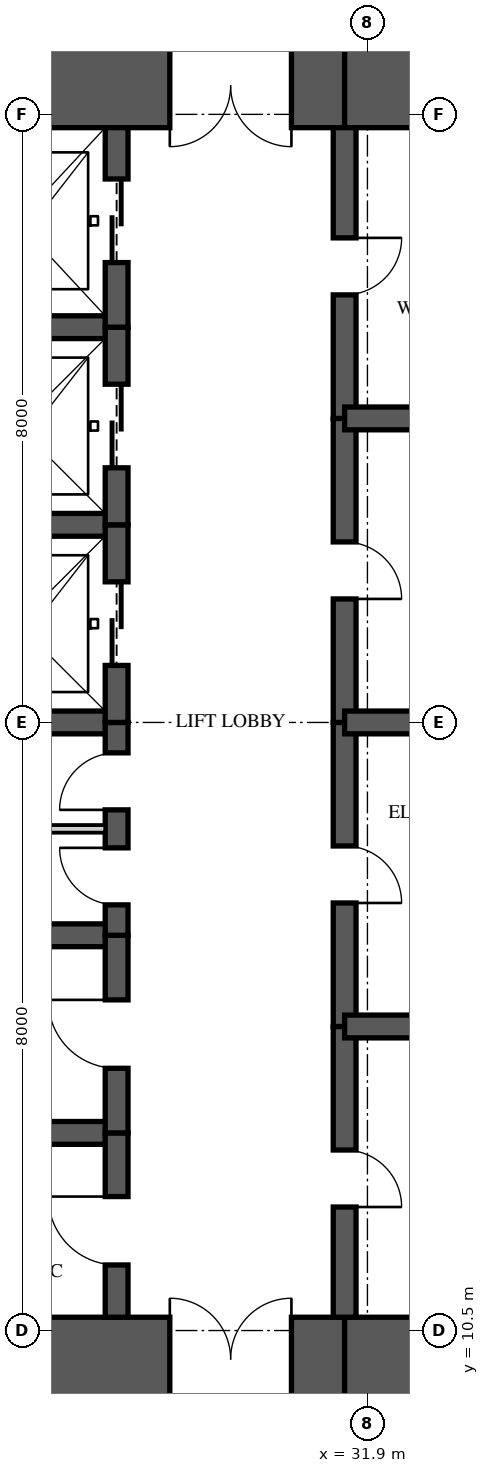
"""IFC4 building model, lengths in metres.
Left out: names, types, materials, properties, quantities, classifications, styles, units other than length and angle.
Written with IfcOpenShell. Run it as: python <this file> out.ifc"""

import sys

from ifc_helpers import new_model, si_unit, direction, frame, frame_2d, origin, place, context, subcontext, project, spatial, rectangle, extrude, element, fill, save


model = new_model("IFC4")
c1 = context("Model", 3, precision=1e-05, world=origin(), true_north=direction((0.0, 1.0)))
c2 = subcontext(c1, "Body", "Model", "MODEL_VIEW")
j1 = project(units=[si_unit("LENGTHUNIT", "METRE"), si_unit("PLANEANGLEUNIT", "RADIAN")], contexts=[c1])
p1 = place(None, origin())
s1 = spatial("IfcSite", under=j1, at=p1, CompositionType="ELEMENT")
p2 = place(p1, origin())
s2 = spatial("IfcBuilding", under=s1, at=p2, CompositionType="ELEMENT")
p3 = place(p2, frame((0.0, 0.0, 252.95)))
s3 = spatial("IfcBuildingStorey", under=s2, at=p3, CompositionType="ELEMENT", Elevation=252.95)
p4 = place(p3, frame((26.0, 10.125, 0.0), z_axis=(0.0, 0.0, 1.0), x_axis=(1.0, 0.0, 0.0)))
e1 = element("IfcWall", 1, at=p4, inside=s3, PredefinedType="SHEAR", context=c2, shape_type="SweptSolid", body=[
    extrude(rectangle(XDim=5.6, YDim=1.1, at=frame_2d((2.8, 0.0))), origin(), (0.0, 0.0, 1.0), 3.5),
])
p5 = place(p4, frame((3.3, 0.0, 0.0)))
e2 = element("IfcOpeningElement", 2, at=p5, cuts=e1, PredefinedType="OPENING", context=c2, shape_type="SweptSolid", body=[
    extrude(rectangle(XDim=1.6, YDim=2.1, at=frame_2d((0.8, 1.05))), frame((0.0, 0.56, 0.0), z_axis=(0.0, -1.0, 0.0), x_axis=(1.0, 0.0, 0.0)), (0.0, 0.0, 1.0), 1.12),
])
for number, where, z_axis, x_axis in (
    (3, (31.6, 10.125, 0.0), (0.0, 0.0, 1.0), (1.0, 0.0, 0.0)),
    (4, (35.9, 26.875, 0.0), (0.0, 0.0, 1.0), (-1.0, 0.0, 0.0)),
):
    element("IfcWall", number, at=place(p3, frame(where, z_axis=z_axis, x_axis=x_axis)), inside=s3, PredefinedType="SHEAR", context=c2, shape_type="SweptSolid", body=[
        extrude(rectangle(XDim=4.3, YDim=1.1, at=frame_2d((2.15, 0.0))), origin(), (0.0, 0.0, 1.0), 3.5),
    ])
p6 = place(p3, frame((31.6, 26.875, 0.0), z_axis=(0.0, 0.0, 1.0), x_axis=(-1.0, 0.0, 0.0)))
e5 = element("IfcWall", 5, at=p6, inside=s3, PredefinedType="SHEAR", context=c2, shape_type="SweptSolid", body=[
    extrude(rectangle(XDim=5.6, YDim=1.1, at=frame_2d((2.8, 0.0))), origin(), (0.0, 0.0, 1.0), 3.5),
])
p7 = place(p6, frame((0.7, 0.0, 0.0)))
e6 = element("IfcOpeningElement", 6, at=p7, cuts=e5, PredefinedType="OPENING", context=c2, shape_type="SweptSolid", body=[
    extrude(rectangle(XDim=1.6, YDim=2.1, at=frame_2d((0.8, 1.05))), frame((0.0, 0.56, 0.0), z_axis=(0.0, -1.0, 0.0), x_axis=(1.0, 0.0, 0.0)), (0.0, 0.0, 1.0), 1.12),
])
p8 = place(p3, frame((28.6, 10.675, 0.0), z_axis=(0.0, 0.0, 1.0), x_axis=(0.0, 1.0, 0.0)))
e7 = element("IfcWall", 7, at=p8, inside=s3, PredefinedType="SHEAR", context=c2, shape_type="SweptSolid", body=[
    extrude(rectangle(XDim=2.425, YDim=0.3, at=frame_2d((1.212, 0.0))), origin(), (0.0, 0.0, 1.0), 3.5),
])
p9 = place(p8, frame((0.688, 0.0, 0.0)))
e8 = element("IfcOpeningElement", 8, at=p9, cuts=e7, PredefinedType="OPENING", context=c2, shape_type="SweptSolid", body=[
    extrude(rectangle(XDim=0.9, YDim=2.1, at=frame_2d((0.45, 1.05))), frame((0.0, 0.16, 0.0), z_axis=(0.0, -1.0, 0.0), x_axis=(1.0, 0.0, 0.0)), (0.0, 0.0, 1.0), 0.32),
])
p10 = place(p3, frame((28.6, 13.1, 0.0), z_axis=(0.0, 0.0, 1.0), x_axis=(0.0, 1.0, 0.0)))
e9 = element("IfcWall", 9, at=p10, inside=s3, PredefinedType="SHEAR", context=c2, shape_type="SweptSolid", body=[
    extrude(rectangle(XDim=2.6, YDim=0.3, at=frame_2d((1.3, 0.0))), origin(), (0.0, 0.0, 1.0), 3.5),
])
p11 = place(p10, frame((0.85, 0.0, 0.0)))
e10 = element("IfcOpeningElement", 10, at=p11, cuts=e9, PredefinedType="OPENING", context=c2, shape_type="SweptSolid", body=[
    extrude(rectangle(XDim=0.9, YDim=2.1, at=frame_2d((0.45, 1.05))), frame((0.0, 0.16, 0.0), z_axis=(0.0, -1.0, 0.0), x_axis=(1.0, 0.0, 0.0)), (0.0, 0.0, 1.0), 0.32),
])
p12 = place(p3, frame((28.6, 15.7, 0.0), z_axis=(0.0, 0.0, 1.0), x_axis=(0.0, 1.0, 0.0)))
e11 = element("IfcWall", 11, at=p12, inside=s3, PredefinedType="SHEAR", context=c2, shape_type="SweptSolid", body=[
    extrude(rectangle(XDim=2.8, YDim=0.3, at=frame_2d((1.4, 0.0))), origin(), (0.0, 0.0, 1.0), 3.5),
])
p13 = place(p12, frame((0.4, 0.0, 0.0)))
e12 = element("IfcOpeningElement", 12, at=p13, cuts=e11, PredefinedType="OPENING", context=c2, shape_type="SweptSolid", body=[
    extrude(rectangle(XDim=0.75, YDim=2.1, at=frame_2d((0.375, 1.05))), frame((0.0, 0.16, 0.0), z_axis=(0.0, -1.0, 0.0), x_axis=(1.0, 0.0, 0.0)), (0.0, 0.0, 1.0), 0.32),
])
p14 = place(p12, frame((1.65, 0.0, 0.0)))
e13 = element("IfcOpeningElement", 13, at=p14, cuts=e11, PredefinedType="OPENING", context=c2, shape_type="SweptSolid", body=[
    extrude(rectangle(XDim=0.75, YDim=2.1, at=frame_2d((0.375, 1.05))), frame((0.0, 0.16, 0.0), z_axis=(0.0, -1.0, 0.0), x_axis=(1.0, 0.0, 0.0)), (0.0, 0.0, 1.0), 0.32),
])
p15 = place(p3, frame((28.6, 18.5, 0.0), z_axis=(0.0, 0.0, 1.0), x_axis=(0.0, 1.0, 0.0)))
e14 = element("IfcWall", 14, at=p15, inside=s3, PredefinedType="SHEAR", context=c2, shape_type="SweptSolid", body=[
    extrude(rectangle(XDim=2.6, YDim=0.3, at=frame_2d((1.3, 0.0))), origin(), (0.0, 0.0, 1.0), 3.5),
])
p16 = place(p15, frame((0.75, 0.0, 0.0)))
e15 = element("IfcOpeningElement", 15, at=p16, cuts=e14, PredefinedType="OPENING", context=c2, shape_type="SweptSolid", body=[
    extrude(rectangle(XDim=1.1, YDim=2.1, at=frame_2d((0.55, 1.05))), frame((0.0, 0.16, 0.0), z_axis=(0.0, -1.0, 0.0), x_axis=(1.0, 0.0, 0.0)), (0.0, 0.0, 1.0), 0.32),
])
p17 = place(p3, frame((28.6, 21.1, 0.0), z_axis=(0.0, 0.0, 1.0), x_axis=(0.0, 1.0, 0.0)))
e16 = element("IfcWall", 16, at=p17, inside=s3, PredefinedType="SHEAR", context=c2, shape_type="SweptSolid", body=[
    extrude(rectangle(XDim=2.6, YDim=0.3, at=frame_2d((1.3, 0.0))), origin(), (0.0, 0.0, 1.0), 3.5),
])
p18 = place(p17, frame((0.75, 0.0, 0.0)))
e17 = element("IfcOpeningElement", 17, at=p18, cuts=e16, PredefinedType="OPENING", context=c2, shape_type="SweptSolid", body=[
    extrude(rectangle(XDim=1.1, YDim=2.1, at=frame_2d((0.55, 1.05))), frame((0.0, 0.16, 0.0), z_axis=(0.0, -1.0, 0.0), x_axis=(1.0, 0.0, 0.0)), (0.0, 0.0, 1.0), 0.32),
])
p19 = place(p3, frame((28.6, 23.7, 0.0), z_axis=(0.0, 0.0, 1.0), x_axis=(0.0, 1.0, 0.0)))
e18 = element("IfcWall", 18, at=p19, inside=s3, PredefinedType="SHEAR", context=c2, shape_type="SweptSolid", body=[
    extrude(rectangle(XDim=2.625, YDim=0.3, at=frame_2d((1.312, 0.0))), origin(), (0.0, 0.0, 1.0), 3.5),
])
p20 = place(p19, frame((0.85, 0.0, 0.0)))
e19 = element("IfcOpeningElement", 19, at=p20, cuts=e18, PredefinedType="OPENING", context=c2, shape_type="SweptSolid", body=[
    extrude(rectangle(XDim=1.1, YDim=2.1, at=frame_2d((0.55, 1.05))), frame((0.0, 0.16, 0.0), z_axis=(0.0, -1.0, 0.0), x_axis=(1.0, 0.0, 0.0)), (0.0, 0.0, 1.0), 0.32),
])
p21 = place(p3, frame((31.6, 10.675, 0.0), z_axis=(0.0, 0.0, 1.0), x_axis=(0.0, 1.0, 0.0)))
e20 = element("IfcWall", 20, at=p21, inside=s3, PredefinedType="SHEAR", context=c2, shape_type="SweptSolid", body=[
    extrude(rectangle(XDim=3.825, YDim=0.3, at=frame_2d((1.913, 0.0))), origin(), (0.0, 0.0, 1.0), 3.5),
])
p22 = place(p21, frame((1.45, 0.0, 0.0)))
e21 = element("IfcOpeningElement", 21, at=p22, cuts=e20, PredefinedType="OPENING", context=c2, shape_type="SweptSolid", body=[
    extrude(rectangle(XDim=0.75, YDim=2.1, at=frame_2d((0.375, 1.05))), frame((0.0, 0.16, 0.0), z_axis=(0.0, -1.0, 0.0), x_axis=(1.0, 0.0, 0.0)), (0.0, 0.0, 1.0), 0.32),
])
p23 = place(p3, frame((31.6, 14.5, 0.0), z_axis=(0.0, 0.0, 1.0), x_axis=(0.0, 1.0, 0.0)))
e22 = element("IfcWall", 22, at=p23, inside=s3, PredefinedType="SHEAR", context=c2, shape_type="SweptSolid", body=[
    extrude(rectangle(XDim=4.0, YDim=0.3, at=frame_2d((2.0, 0.0))), origin(), (0.0, 0.0, 1.0), 3.5),
])
p24 = place(p23, frame((1.625, 0.0, 0.0)))
e23 = element("IfcOpeningElement", 23, at=p24, cuts=e22, PredefinedType="OPENING", context=c2, shape_type="SweptSolid", body=[
    extrude(rectangle(XDim=0.75, YDim=2.1, at=frame_2d((0.375, 1.05))), frame((0.0, 0.16, 0.0), z_axis=(0.0, -1.0, 0.0), x_axis=(1.0, 0.0, 0.0)), (0.0, 0.0, 1.0), 0.32),
])
p25 = place(p3, frame((31.6, 18.5, 0.0), z_axis=(0.0, 0.0, 1.0), x_axis=(0.0, 1.0, 0.0)))
e24 = element("IfcWall", 24, at=p25, inside=s3, PredefinedType="SHEAR", context=c2, shape_type="SweptSolid", body=[
    extrude(rectangle(XDim=4.0, YDim=0.3, at=frame_2d((2.0, 0.0))), origin(), (0.0, 0.0, 1.0), 3.5),
])
p26 = place(p25, frame((1.625, 0.0, 0.0)))
e25 = element("IfcOpeningElement", 25, at=p26, cuts=e24, PredefinedType="OPENING", context=c2, shape_type="SweptSolid", body=[
    extrude(rectangle(XDim=0.75, YDim=2.1, at=frame_2d((0.375, 1.05))), frame((0.0, 0.16, 0.0), z_axis=(0.0, -1.0, 0.0), x_axis=(1.0, 0.0, 0.0)), (0.0, 0.0, 1.0), 0.32),
])
p27 = place(p3, frame((31.6, 22.5, 0.0), z_axis=(0.0, 0.0, 1.0), x_axis=(0.0, 1.0, 0.0)))
e26 = element("IfcWall", 26, at=p27, inside=s3, PredefinedType="SHEAR", context=c2, shape_type="SweptSolid", body=[
    extrude(rectangle(XDim=3.825, YDim=0.3, at=frame_2d((1.913, 0.0))), origin(), (0.0, 0.0, 1.0), 3.5),
])
p28 = place(p27, frame((1.625, 0.0, 0.0)))
e27 = element("IfcOpeningElement", 27, at=p28, cuts=e26, PredefinedType="OPENING", context=c2, shape_type="SweptSolid", body=[
    extrude(rectangle(XDim=0.75, YDim=2.1, at=frame_2d((0.375, 1.05))), frame((0.0, 0.16, 0.0), z_axis=(0.0, -1.0, 0.0), x_axis=(1.0, 0.0, 0.0)), (0.0, 0.0, 1.0), 0.32),
])
for number, where, z_axis, x_axis in (
    (28, (26.0, 13.1, 0.0), (0.0, 0.0, 1.0), (1.0, 0.0, 0.0)),
    (29, (26.0, 15.7, 0.0), (0.0, 0.0, 1.0), (1.0, 0.0, 0.0)),
    (30, (26.0, 18.5, 0.0), (0.0, 0.0, 1.0), (1.0, 0.0, 0.0)),
    (31, (26.0, 21.1, 0.0), (0.0, 0.0, 1.0), (1.0, 0.0, 0.0)),
    (32, (26.0, 23.7, 0.0), (0.0, 0.0, 1.0), (1.0, 0.0, 0.0)),
):
    element("IfcWall", number, at=place(p3, frame(where, z_axis=z_axis, x_axis=x_axis)), inside=s3, PredefinedType="SHEAR", context=c2, shape_type="SweptSolid", body=[
        extrude(rectangle(XDim=2.6, YDim=0.3, at=frame_2d((1.3, 0.0))), origin(), (0.0, 0.0, 1.0), 3.5),
    ])
for number, where, z_axis, x_axis in (
    (33, (31.6, 14.5, 0.0), (0.0, 0.0, 1.0), (1.0, 0.0, 0.0)),
    (34, (31.6, 18.5, 0.0), (0.0, 0.0, 1.0), (1.0, 0.0, 0.0)),
    (35, (31.6, 22.5, 0.0), (0.0, 0.0, 1.0), (1.0, 0.0, 0.0)),
):
    element("IfcWall", number, at=place(p3, frame(where, z_axis=z_axis, x_axis=x_axis)), inside=s3, PredefinedType="SHEAR", context=c2, shape_type="SweptSolid", body=[
        extrude(rectangle(XDim=4.3, YDim=0.3, at=frame_2d((2.15, 0.0))), origin(), (0.0, 0.0, 1.0), 3.5),
    ])
p29 = place(p3, frame((26.15, 17.1, 0.0), z_axis=(0.0, 0.0, 1.0), x_axis=(1.0, 0.0, 0.0)))
e36 = element("IfcWall", 36, at=p29, inside=s3, PredefinedType="PARTITIONING", context=c2, shape_type="SweptSolid", body=[
    extrude(rectangle(XDim=2.3, YDim=0.1, at=frame_2d((1.15, 0.0))), origin(), (0.0, 0.0, 1.0), 3.26),
])
p30 = place(p16, origin())
e37 = element("IfcDoor", 37, at=p30, inside=s3, OperationType="SLIDING_TO_LEFT", PredefinedType="DOOR", context=c2, shape_type="SweptSolid", body=[
    extrude(rectangle(XDim=1.1, YDim=2.1, at=frame_2d((0.55, 1.05))), frame((0.0, 0.025, 0.0), z_axis=(0.0, -1.0, 0.0), x_axis=(1.0, 0.0, 0.0)), (0.0, 0.0, 1.0), 0.05),
])
fill(e15, e37)
p31 = place(p18, origin())
e38 = element("IfcDoor", 38, at=p31, inside=s3, OperationType="SLIDING_TO_LEFT", PredefinedType="DOOR", context=c2, shape_type="SweptSolid", body=[
    extrude(rectangle(XDim=1.1, YDim=2.1, at=frame_2d((0.55, 1.05))), frame((0.0, 0.025, 0.0), z_axis=(0.0, -1.0, 0.0), x_axis=(1.0, 0.0, 0.0)), (0.0, 0.0, 1.0), 0.05),
])
fill(e17, e38)
p32 = place(p20, origin())
e39 = element("IfcDoor", 39, at=p32, inside=s3, OperationType="SLIDING_TO_LEFT", PredefinedType="DOOR", context=c2, shape_type="SweptSolid", body=[
    extrude(rectangle(XDim=1.1, YDim=2.1, at=frame_2d((0.55, 1.05))), frame((0.0, 0.025, 0.0), z_axis=(0.0, -1.0, 0.0), x_axis=(1.0, 0.0, 0.0)), (0.0, 0.0, 1.0), 0.05),
])
fill(e19, e39)
p33 = place(p9, origin())
e40 = element("IfcDoor", 40, at=p33, inside=s3, OperationType="SINGLE_SWING_RIGHT", PredefinedType="DOOR", context=c2, shape_type="SweptSolid", body=[
    extrude(rectangle(XDim=0.9, YDim=2.1, at=frame_2d((0.45, 1.05))), frame((0.0, 0.025, 0.0), z_axis=(0.0, -1.0, 0.0), x_axis=(1.0, 0.0, 0.0)), (0.0, 0.0, 1.0), 0.05),
])
fill(e8, e40)
p34 = place(p11, origin())
e41 = element("IfcDoor", 41, at=p34, inside=s3, OperationType="SINGLE_SWING_RIGHT", PredefinedType="DOOR", context=c2, shape_type="SweptSolid", body=[
    extrude(rectangle(XDim=0.9, YDim=2.1, at=frame_2d((0.45, 1.05))), frame((0.0, 0.025, 0.0), z_axis=(0.0, -1.0, 0.0), x_axis=(1.0, 0.0, 0.0)), (0.0, 0.0, 1.0), 0.05),
])
fill(e10, e41)
p35 = place(p13, origin())
e42 = element("IfcDoor", 42, at=p35, inside=s3, OperationType="SINGLE_SWING_RIGHT", PredefinedType="DOOR", context=c2, shape_type="SweptSolid", body=[
    extrude(rectangle(XDim=0.75, YDim=2.1, at=frame_2d((0.375, 1.05))), frame((0.0, 0.025, 0.0), z_axis=(0.0, -1.0, 0.0), x_axis=(1.0, 0.0, 0.0)), (0.0, 0.0, 1.0), 0.05),
])
fill(e12, e42)
p36 = place(p14, origin())
e43 = element("IfcDoor", 43, at=p36, inside=s3, OperationType="SINGLE_SWING_LEFT", PredefinedType="DOOR", context=c2, shape_type="SweptSolid", body=[
    extrude(rectangle(XDim=0.75, YDim=2.1, at=frame_2d((0.375, 1.05))), frame((0.0, 0.025, 0.0), z_axis=(0.0, -1.0, 0.0), x_axis=(1.0, 0.0, 0.0)), (0.0, 0.0, 1.0), 0.05),
])
fill(e13, e43)
p37 = place(p5, origin())
e44 = element("IfcDoor", 44, at=p37, inside=s3, OperationType="DOUBLE_DOOR_SINGLE_SWING", PredefinedType="DOOR", context=c2, shape_type="SweptSolid", body=[
    extrude(rectangle(XDim=1.6, YDim=2.1, at=frame_2d((0.8, 1.05))), frame((0.0, 0.025, 0.0), z_axis=(0.0, -1.0, 0.0), x_axis=(1.0, 0.0, 0.0)), (0.0, 0.0, 1.0), 0.05),
])
fill(e2, e44)
p38 = place(p7, origin())
e45 = element("IfcDoor", 45, at=p38, inside=s3, OperationType="DOUBLE_DOOR_SINGLE_SWING", PredefinedType="DOOR", context=c2, shape_type="SweptSolid", body=[
    extrude(rectangle(XDim=1.6, YDim=2.1, at=frame_2d((0.8, 1.05))), frame((0.0, 0.025, 0.0), z_axis=(0.0, -1.0, 0.0), x_axis=(1.0, 0.0, 0.0)), (0.0, 0.0, 1.0), 0.05),
])
fill(e6, e45)
p39 = place(p22, frame((0.75, 0.0, 0.0), z_axis=(0.0, 0.0, 1.0), x_axis=(-1.0, 0.0, 0.0)))
e46 = element("IfcDoor", 46, at=p39, inside=s3, OperationType="SINGLE_SWING_RIGHT", PredefinedType="DOOR", context=c2, shape_type="SweptSolid", body=[
    extrude(rectangle(XDim=0.75, YDim=2.1, at=frame_2d((0.375, 1.05))), frame((0.0, 0.025, 0.0), z_axis=(0.0, -1.0, 0.0), x_axis=(1.0, 0.0, 0.0)), (0.0, 0.0, 1.0), 0.05),
])
fill(e21, e46)
p40 = place(p24, frame((0.75, 0.0, 0.0), z_axis=(0.0, 0.0, 1.0), x_axis=(-1.0, 0.0, 0.0)))
e47 = element("IfcDoor", 47, at=p40, inside=s3, OperationType="SINGLE_SWING_RIGHT", PredefinedType="DOOR", context=c2, shape_type="SweptSolid", body=[
    extrude(rectangle(XDim=0.75, YDim=2.1, at=frame_2d((0.375, 1.05))), frame((0.0, 0.025, 0.0), z_axis=(0.0, -1.0, 0.0), x_axis=(1.0, 0.0, 0.0)), (0.0, 0.0, 1.0), 0.05),
])
fill(e23, e47)
p41 = place(p26, frame((0.75, 0.0, 0.0), z_axis=(0.0, 0.0, 1.0), x_axis=(-1.0, 0.0, 0.0)))
e48 = element("IfcDoor", 48, at=p41, inside=s3, OperationType="SINGLE_SWING_RIGHT", PredefinedType="DOOR", context=c2, shape_type="SweptSolid", body=[
    extrude(rectangle(XDim=0.75, YDim=2.1, at=frame_2d((0.375, 1.05))), frame((0.0, 0.025, 0.0), z_axis=(0.0, -1.0, 0.0), x_axis=(1.0, 0.0, 0.0)), (0.0, 0.0, 1.0), 0.05),
])
fill(e25, e48)
p42 = place(p28, frame((0.75, 0.0, 0.0), z_axis=(0.0, 0.0, 1.0), x_axis=(-1.0, 0.0, 0.0)))
e49 = element("IfcDoor", 49, at=p42, inside=s3, OperationType="SINGLE_SWING_LEFT", PredefinedType="DOOR", context=c2, shape_type="SweptSolid", body=[
    extrude(rectangle(XDim=0.75, YDim=2.1, at=frame_2d((0.375, 1.05))), frame((0.0, 0.025, 0.0), z_axis=(0.0, -1.0, 0.0), x_axis=(1.0, 0.0, 0.0)), (0.0, 0.0, 1.0), 0.05),
])
fill(e27, e49)
save(model, sys.argv[1])
